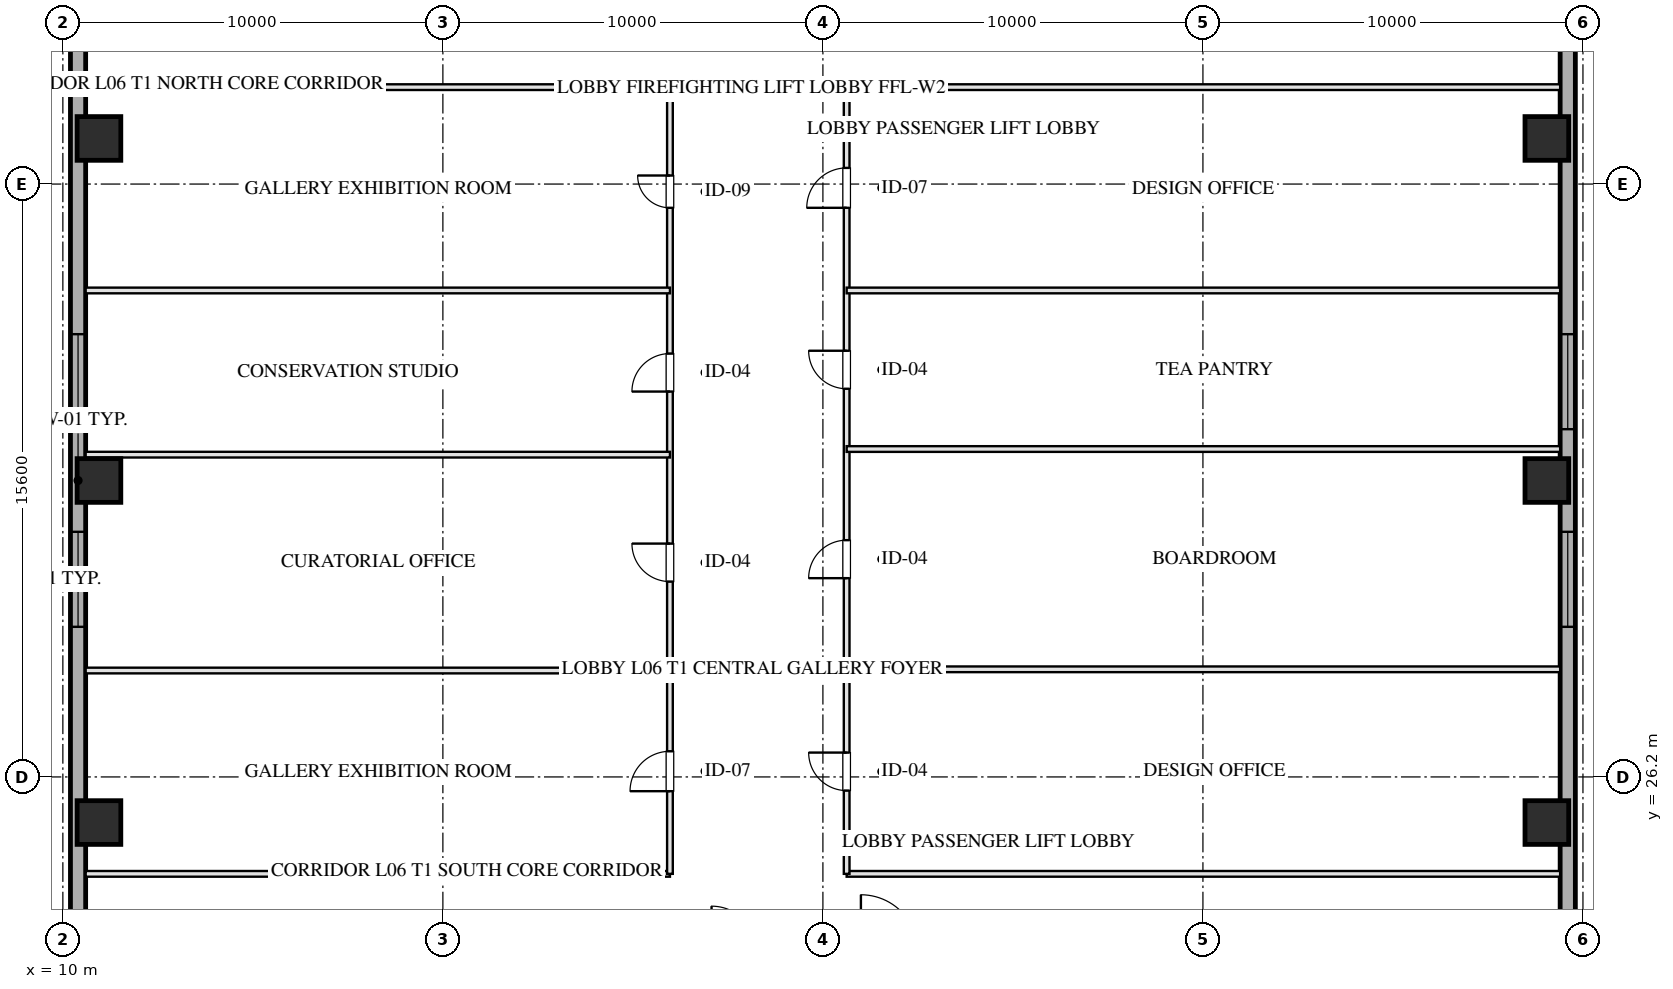
"""IFC4 building model, lengths in metres.
Left out: names, types, materials, properties, quantities, classifications, styles, units other than length and angle.
Written with IfcOpenShell. Run it as: python <this file> out.ifc"""

import sys

from ifc_helpers import new_model, si_unit, direction, frame, frame_2d, origin, origin_2d, place, context, subcontext, project, spatial, rectangle, hollow_rectangle, extrude, element, fill, save


model = new_model("IFC4")
c1 = context("Model", 3, precision=1e-05, world=origin(), true_north=direction((0.0, 1.0)))
c2 = subcontext(c1, "Body", "Model", "MODEL_VIEW")
j1 = project(units=[si_unit("LENGTHUNIT", "METRE"), si_unit("PLANEANGLEUNIT", "RADIAN")], contexts=[c1])
p1 = place(None, origin())
s1 = spatial("IfcSite", under=j1, at=p1, CompositionType="ELEMENT")
p2 = place(p1, origin())
s2 = spatial("IfcBuilding", under=s1, at=p2, CompositionType="ELEMENT")
p3 = place(p2, frame((0.0, 0.0, 30.0)))
s3 = spatial("IfcBuildingStorey", under=s2, at=p3, CompositionType="ELEMENT", Elevation=30.0)
for number, where, z_axis, x_axis in (
    (1, (10.95, 25.0, 0.0), (0.0, 0.0, 1.0), (1.0, 0.0, 0.0)),
    (2, (10.95, 34.0, 0.0), (0.0, 0.0, 1.0), (1.0, 0.0, 0.0)),
    (3, (10.95, 43.0, 0.0), (0.0, 0.0, 1.0), (1.0, 0.0, 0.0)),
    (4, (49.05, 25.0, 0.0), (0.0, 0.0, 1.0), (1.0, 0.0, 0.0)),
    (5, (49.05, 34.0, 0.0), (0.0, 0.0, 1.0), (1.0, 0.0, 0.0)),
    (6, (49.05, 43.0, 0.0), (0.0, 0.0, 1.0), (1.0, 0.0, 0.0)),
):
    element("IfcColumn", number, at=place(p3, frame(where, z_axis=z_axis, x_axis=x_axis)), inside=s3, PredefinedType="COLUMN", context=c2, shape_type="SweptSolid", body=[
        extrude(hollow_rectangle(XDim=1.15, YDim=1.15, WallThickness=0.04, at=origin_2d()), origin(), (0.0, 0.0, 1.0), 4.001),
    ])
p4 = place(p3, frame((10.4, 7.2, 0.0), z_axis=(0.0, 0.0, 1.0), x_axis=(0.0, 1.0, 0.0)))
e7 = element("IfcWall", 7, at=p4, inside=s3, PredefinedType="SOLIDWALL", context=c2, shape_type="SweptSolid", body=[
    extrude(rectangle(XDim=53.6, YDim=0.4, at=frame_2d((26.8, 0.0))), origin(), (0.0, 0.0, 1.0), 3.16),
])
p5 = place(p4, frame((22.95, 0.0, 0.75)))
e8 = element("IfcOpeningElement", 8, at=p5, cuts=e7, PredefinedType="OPENING", context=c2, shape_type="SweptSolid", body=[
    extrude(rectangle(XDim=2.5, YDim=1.75, at=frame_2d((1.25, 0.875))), frame((0.0, 0.21, 0.0), z_axis=(0.0, -1.0, 0.0), x_axis=(1.0, 0.0, 0.0)), (0.0, 0.0, 1.0), 0.42),
])
p6 = place(p4, frame((28.15, 0.0, 0.75)))
e9 = element("IfcOpeningElement", 9, at=p6, cuts=e7, PredefinedType="OPENING", context=c2, shape_type="SweptSolid", body=[
    extrude(rectangle(XDim=2.5, YDim=1.75, at=frame_2d((1.25, 0.875))), frame((0.0, 0.21, 0.0), z_axis=(0.0, -1.0, 0.0), x_axis=(1.0, 0.0, 0.0)), (0.0, 0.0, 1.0), 0.42),
])
p7 = place(p3, frame((49.6, 60.8, 0.0), z_axis=(0.0, 0.0, 1.0), x_axis=(0.0, -1.0, 0.0)))
e10 = element("IfcWall", 10, at=p7, inside=s3, PredefinedType="SOLIDWALL", context=c2, shape_type="SweptSolid", body=[
    extrude(rectangle(XDim=53.6, YDim=0.4, at=frame_2d((26.8, 0.0))), origin(), (0.0, 0.0, 1.0), 3.16),
])
p8 = place(p7, frame((28.15, 0.0, 0.75)))
e11 = element("IfcOpeningElement", 11, at=p8, cuts=e10, PredefinedType="OPENING", context=c2, shape_type="SweptSolid", body=[
    extrude(rectangle(XDim=2.5, YDim=1.75, at=frame_2d((1.25, 0.875))), frame((0.0, 0.21, 0.0), z_axis=(0.0, -1.0, 0.0), x_axis=(1.0, 0.0, 0.0)), (0.0, 0.0, 1.0), 0.42),
])
p9 = place(p7, frame((22.95, 0.0, 0.75)))
e12 = element("IfcOpeningElement", 12, at=p9, cuts=e10, PredefinedType="OPENING", context=c2, shape_type="SweptSolid", body=[
    extrude(rectangle(XDim=2.5, YDim=1.75, at=frame_2d((1.25, 0.875))), frame((0.0, 0.21, 0.0), z_axis=(0.0, -1.0, 0.0), x_axis=(1.0, 0.0, 0.0)), (0.0, 0.0, 1.0), 0.42),
])
p10 = place(p3, frame((10.6, 23.65, 0.0), z_axis=(0.0, 0.0, 1.0), x_axis=(1.0, 0.0, 0.0)))
e13 = element("IfcWall", 13, at=p10, inside=s3, PredefinedType="PARTITIONING", context=c2, shape_type="SweptSolid", body=[
    extrude(rectangle(XDim=15.375, YDim=0.15, at=frame_2d((7.688, 0.0))), origin(), (0.0, 0.0, 1.0), 3.725),
])
p11 = place(p3, frame((30.625, 23.65, 0.0), z_axis=(0.0, 0.0, 1.0), x_axis=(1.0, 0.0, 0.0)))
e14 = element("IfcWall", 14, at=p11, inside=s3, PredefinedType="PARTITIONING", context=c2, shape_type="SweptSolid", body=[
    extrude(rectangle(XDim=18.775, YDim=0.15, at=frame_2d((9.387, 0.0))), origin(), (0.0, 0.0, 1.0), 3.725),
])
p12 = place(p3, frame((10.6, 44.35, 0.0), z_axis=(0.0, 0.0, 1.0), x_axis=(1.0, 0.0, 0.0)))
e15 = element("IfcWall", 15, at=p12, inside=s3, PredefinedType="PARTITIONING", context=c2, shape_type="SweptSolid", body=[
    extrude(rectangle(XDim=15.375, YDim=0.15, at=frame_2d((7.688, 0.0))), origin(), (0.0, 0.0, 1.0), 3.725),
])
p13 = place(p3, frame((30.625, 44.35, 0.0), z_axis=(0.0, 0.0, 1.0), x_axis=(1.0, 0.0, 0.0)))
e16 = element("IfcWall", 16, at=p13, inside=s3, PredefinedType="PARTITIONING", context=c2, shape_type="SweptSolid", body=[
    extrude(rectangle(XDim=18.775, YDim=0.15, at=frame_2d((9.387, 0.0))), origin(), (0.0, 0.0, 1.0), 3.725),
])
p14 = place(p3, frame((25.975, 23.65, 0.0), z_axis=(0.0, 0.0, 1.0), x_axis=(0.0, 1.0, 0.0)))
e17 = element("IfcWall", 17, at=p14, inside=s3, PredefinedType="PARTITIONING", context=c2, shape_type="SweptSolid", body=[
    extrude(rectangle(XDim=20.7, YDim=0.15, at=frame_2d((10.35, 0.0))), origin(), (0.0, 0.0, 1.0), 3.725),
])
p15 = place(p14, frame((2.175, 0.0, 0.0)))
e18 = element("IfcOpeningElement", 18, at=p15, cuts=e17, PredefinedType="OPENING", context=c2, shape_type="SweptSolid", body=[
    extrude(rectangle(XDim=1.05, YDim=2.05, at=frame_2d((0.525, 1.025))), frame((0.0, 0.085, 0.0), z_axis=(0.0, -1.0, 0.0), x_axis=(1.0, 0.0, 0.0)), (0.0, 0.0, 1.0), 0.17),
])
p16 = place(p14, frame((7.69, 0.0, 0.0)))
e19 = element("IfcOpeningElement", 19, at=p16, cuts=e17, PredefinedType="OPENING", context=c2, shape_type="SweptSolid", body=[
    extrude(rectangle(XDim=1.0, YDim=2.05, at=frame_2d((0.5, 1.025))), frame((0.0, 0.085, 0.0), z_axis=(0.0, -1.0, 0.0), x_axis=(1.0, 0.0, 0.0)), (0.0, 0.0, 1.0), 0.17),
])
p17 = place(p14, frame((12.69, 0.0, 0.0)))
e20 = element("IfcOpeningElement", 20, at=p17, cuts=e17, PredefinedType="OPENING", context=c2, shape_type="SweptSolid", body=[
    extrude(rectangle(XDim=1.0, YDim=2.05, at=frame_2d((0.5, 1.025))), frame((0.0, 0.085, 0.0), z_axis=(0.0, -1.0, 0.0), x_axis=(1.0, 0.0, 0.0)), (0.0, 0.0, 1.0), 0.17),
])
p18 = place(p14, frame((17.525, 0.0, 0.0)))
e21 = element("IfcOpeningElement", 21, at=p18, cuts=e17, PredefinedType="OPENING", context=c2, shape_type="SweptSolid", body=[
    extrude(rectangle(XDim=0.85, YDim=2.05, at=frame_2d((0.425, 1.025))), frame((0.0, 0.085, 0.0), z_axis=(0.0, -1.0, 0.0), x_axis=(1.0, 0.0, 0.0)), (0.0, 0.0, 1.0), 0.17),
])
p19 = place(p3, frame((30.625, 23.65, 0.0), z_axis=(0.0, 0.0, 1.0), x_axis=(0.0, 1.0, 0.0)))
e22 = element("IfcWall", 22, at=p19, inside=s3, PredefinedType="PARTITIONING", context=c2, shape_type="SweptSolid", body=[
    extrude(rectangle(XDim=20.7, YDim=0.15, at=frame_2d((10.35, 0.0))), origin(), (0.0, 0.0, 1.0), 3.725),
])
p20 = place(p19, frame((2.191, 0.0, 0.0)))
e23 = element("IfcOpeningElement", 23, at=p20, cuts=e22, PredefinedType="OPENING", context=c2, shape_type="SweptSolid", body=[
    extrude(rectangle(XDim=1.0, YDim=2.05, at=frame_2d((0.5, 1.025))), frame((0.0, 0.085, 0.0), z_axis=(0.0, -1.0, 0.0), x_axis=(1.0, 0.0, 0.0)), (0.0, 0.0, 1.0), 0.17),
])
p21 = place(p19, frame((7.78, 0.0, 0.0)))
e24 = element("IfcOpeningElement", 24, at=p21, cuts=e22, PredefinedType="OPENING", context=c2, shape_type="SweptSolid", body=[
    extrude(rectangle(XDim=1.0, YDim=2.05, at=frame_2d((0.5, 1.025))), frame((0.0, 0.085, 0.0), z_axis=(0.0, -1.0, 0.0), x_axis=(1.0, 0.0, 0.0)), (0.0, 0.0, 1.0), 0.17),
])
p22 = place(p19, frame((12.764, 0.0, 0.0)))
e25 = element("IfcOpeningElement", 25, at=p22, cuts=e22, PredefinedType="OPENING", context=c2, shape_type="SweptSolid", body=[
    extrude(rectangle(XDim=1.0, YDim=2.05, at=frame_2d((0.5, 1.025))), frame((0.0, 0.085, 0.0), z_axis=(0.0, -1.0, 0.0), x_axis=(1.0, 0.0, 0.0)), (0.0, 0.0, 1.0), 0.17),
])
p23 = place(p19, frame((17.525, 0.0, 0.0)))
e26 = element("IfcOpeningElement", 26, at=p23, cuts=e22, PredefinedType="OPENING", context=c2, shape_type="SweptSolid", body=[
    extrude(rectangle(XDim=1.05, YDim=2.05, at=frame_2d((0.525, 1.025))), frame((0.0, 0.085, 0.0), z_axis=(0.0, -1.0, 0.0), x_axis=(1.0, 0.0, 0.0)), (0.0, 0.0, 1.0), 0.17),
])
for number, where, z_axis, x_axis in (
    (27, (10.6, 29.0, 0.0), (0.0, 0.0, 1.0), (1.0, 0.0, 0.0)),
    (28, (10.6, 34.68, 0.0), (0.0, 0.0, 1.0), (1.0, 0.0, 0.0)),
    (29, (10.6, 39.0, 0.0), (0.0, 0.0, 1.0), (1.0, 0.0, 0.0)),
):
    element("IfcWall", number, at=place(p3, frame(where, z_axis=z_axis, x_axis=x_axis)), inside=s3, PredefinedType="PARTITIONING", context=c2, shape_type="SweptSolid", body=[
        extrude(rectangle(XDim=15.375, YDim=0.15, at=frame_2d((7.688, 0.0))), origin(), (0.0, 0.0, 1.0), 3.725),
    ])
for number, where, z_axis, x_axis in (
    (30, (30.625, 29.032, 0.0), (0.0, 0.0, 1.0), (1.0, 0.0, 0.0)),
    (31, (30.625, 34.828, 0.0), (0.0, 0.0, 1.0), (1.0, 0.0, 0.0)),
    (32, (30.625, 39.0, 0.0), (0.0, 0.0, 1.0), (1.0, 0.0, 0.0)),
):
    element("IfcWall", number, at=place(p3, frame(where, z_axis=z_axis, x_axis=x_axis)), inside=s3, PredefinedType="PARTITIONING", context=c2, shape_type="SweptSolid", body=[
        extrude(rectangle(XDim=18.775, YDim=0.15, at=frame_2d((9.387, 0.0))), origin(), (0.0, 0.0, 1.0), 3.725),
    ])
p24 = place(p5, origin())
e33 = element("IfcWindow", 33, at=p24, inside=s3, PartitioningType="TRIPLE_PANEL_VERTICAL", PredefinedType="WINDOW", context=c2, shape_type="SweptSolid", body=[
    extrude(rectangle(XDim=2.5, YDim=1.75, at=frame_2d((1.25, 0.875))), frame((0.0, 0.03, 0.0), z_axis=(0.0, -1.0, 0.0), x_axis=(1.0, 0.0, 0.0)), (0.0, 0.0, 1.0), 0.06),
])
fill(e8, e33)
p25 = place(p6, origin())
e34 = element("IfcWindow", 34, at=p25, inside=s3, PartitioningType="TRIPLE_PANEL_VERTICAL", PredefinedType="WINDOW", context=c2, shape_type="SweptSolid", body=[
    extrude(rectangle(XDim=2.5, YDim=1.75, at=frame_2d((1.25, 0.875))), frame((0.0, 0.03, 0.0), z_axis=(0.0, -1.0, 0.0), x_axis=(1.0, 0.0, 0.0)), (0.0, 0.0, 1.0), 0.06),
])
fill(e9, e34)
p26 = place(p8, origin())
e35 = element("IfcWindow", 35, at=p26, inside=s3, PartitioningType="TRIPLE_PANEL_VERTICAL", PredefinedType="WINDOW", context=c2, shape_type="SweptSolid", body=[
    extrude(rectangle(XDim=2.5, YDim=1.75, at=frame_2d((1.25, 0.875))), frame((0.0, 0.03, 0.0), z_axis=(0.0, -1.0, 0.0), x_axis=(1.0, 0.0, 0.0)), (0.0, 0.0, 1.0), 0.06),
])
fill(e11, e35)
p27 = place(p9, origin())
e36 = element("IfcWindow", 36, at=p27, inside=s3, PartitioningType="TRIPLE_PANEL_VERTICAL", PredefinedType="WINDOW", context=c2, shape_type="SweptSolid", body=[
    extrude(rectangle(XDim=2.5, YDim=1.75, at=frame_2d((1.25, 0.875))), frame((0.0, 0.03, 0.0), z_axis=(0.0, -1.0, 0.0), x_axis=(1.0, 0.0, 0.0)), (0.0, 0.0, 1.0), 0.06),
])
fill(e12, e36)
p28 = place(p15, origin())
e37 = element("IfcDoor", 37, at=p28, inside=s3, OperationType="SINGLE_SWING_LEFT", PredefinedType="DOOR", context=c2, shape_type="SweptSolid", body=[
    extrude(rectangle(XDim=1.05, YDim=2.05, at=frame_2d((0.525, 1.025))), frame((0.0, 0.025, 0.0), z_axis=(0.0, -1.0, 0.0), x_axis=(1.0, 0.0, 0.0)), (0.0, 0.0, 1.0), 0.05),
])
fill(e18, e37)
p29 = place(p16, origin())
e38 = element("IfcDoor", 38, at=p29, inside=s3, OperationType="SINGLE_SWING_RIGHT", PredefinedType="DOOR", context=c2, shape_type="SweptSolid", body=[
    extrude(rectangle(XDim=1.0, YDim=2.05, at=frame_2d((0.5, 1.025))), frame((0.0, 0.025, 0.0), z_axis=(0.0, -1.0, 0.0), x_axis=(1.0, 0.0, 0.0)), (0.0, 0.0, 1.0), 0.05),
])
fill(e19, e38)
p30 = place(p17, origin())
e39 = element("IfcDoor", 39, at=p30, inside=s3, OperationType="SINGLE_SWING_LEFT", PredefinedType="DOOR", context=c2, shape_type="SweptSolid", body=[
    extrude(rectangle(XDim=1.0, YDim=2.05, at=frame_2d((0.5, 1.025))), frame((0.0, 0.025, 0.0), z_axis=(0.0, -1.0, 0.0), x_axis=(1.0, 0.0, 0.0)), (0.0, 0.0, 1.0), 0.05),
])
fill(e20, e39)
p31 = place(p18, origin())
e40 = element("IfcDoor", 40, at=p31, inside=s3, OperationType="SINGLE_SWING_RIGHT", PredefinedType="DOOR", context=c2, shape_type="SweptSolid", body=[
    extrude(rectangle(XDim=0.85, YDim=2.05, at=frame_2d((0.425, 1.025))), frame((0.0, 0.025, 0.0), z_axis=(0.0, -1.0, 0.0), x_axis=(1.0, 0.0, 0.0)), (0.0, 0.0, 1.0), 0.05),
])
fill(e21, e40)
p32 = place(p20, origin())
e41 = element("IfcDoor", 41, at=p32, inside=s3, OperationType="SINGLE_SWING_RIGHT", PredefinedType="DOOR", context=c2, shape_type="SweptSolid", body=[
    extrude(rectangle(XDim=1.0, YDim=2.05, at=frame_2d((0.5, 1.025))), frame((0.0, 0.025, 0.0), z_axis=(0.0, -1.0, 0.0), x_axis=(1.0, 0.0, 0.0)), (0.0, 0.0, 1.0), 0.05),
])
fill(e23, e41)
p33 = place(p21, origin())
e42 = element("IfcDoor", 42, at=p33, inside=s3, OperationType="SINGLE_SWING_LEFT", PredefinedType="DOOR", context=c2, shape_type="SweptSolid", body=[
    extrude(rectangle(XDim=1.0, YDim=2.05, at=frame_2d((0.5, 1.025))), frame((0.0, 0.025, 0.0), z_axis=(0.0, -1.0, 0.0), x_axis=(1.0, 0.0, 0.0)), (0.0, 0.0, 1.0), 0.05),
])
fill(e24, e42)
p34 = place(p22, origin())
e43 = element("IfcDoor", 43, at=p34, inside=s3, OperationType="SINGLE_SWING_RIGHT", PredefinedType="DOOR", context=c2, shape_type="SweptSolid", body=[
    extrude(rectangle(XDim=1.0, YDim=2.05, at=frame_2d((0.5, 1.025))), frame((0.0, 0.025, 0.0), z_axis=(0.0, -1.0, 0.0), x_axis=(1.0, 0.0, 0.0)), (0.0, 0.0, 1.0), 0.05),
])
fill(e25, e43)
p35 = place(p23, origin())
e44 = element("IfcDoor", 44, at=p35, inside=s3, OperationType="SINGLE_SWING_LEFT", PredefinedType="DOOR", context=c2, shape_type="SweptSolid", body=[
    extrude(rectangle(XDim=1.05, YDim=2.05, at=frame_2d((0.525, 1.025))), frame((0.0, 0.025, 0.0), z_axis=(0.0, -1.0, 0.0), x_axis=(1.0, 0.0, 0.0)), (0.0, 0.0, 1.0), 0.05),
])
fill(e26, e44)
save(model, sys.argv[1])
